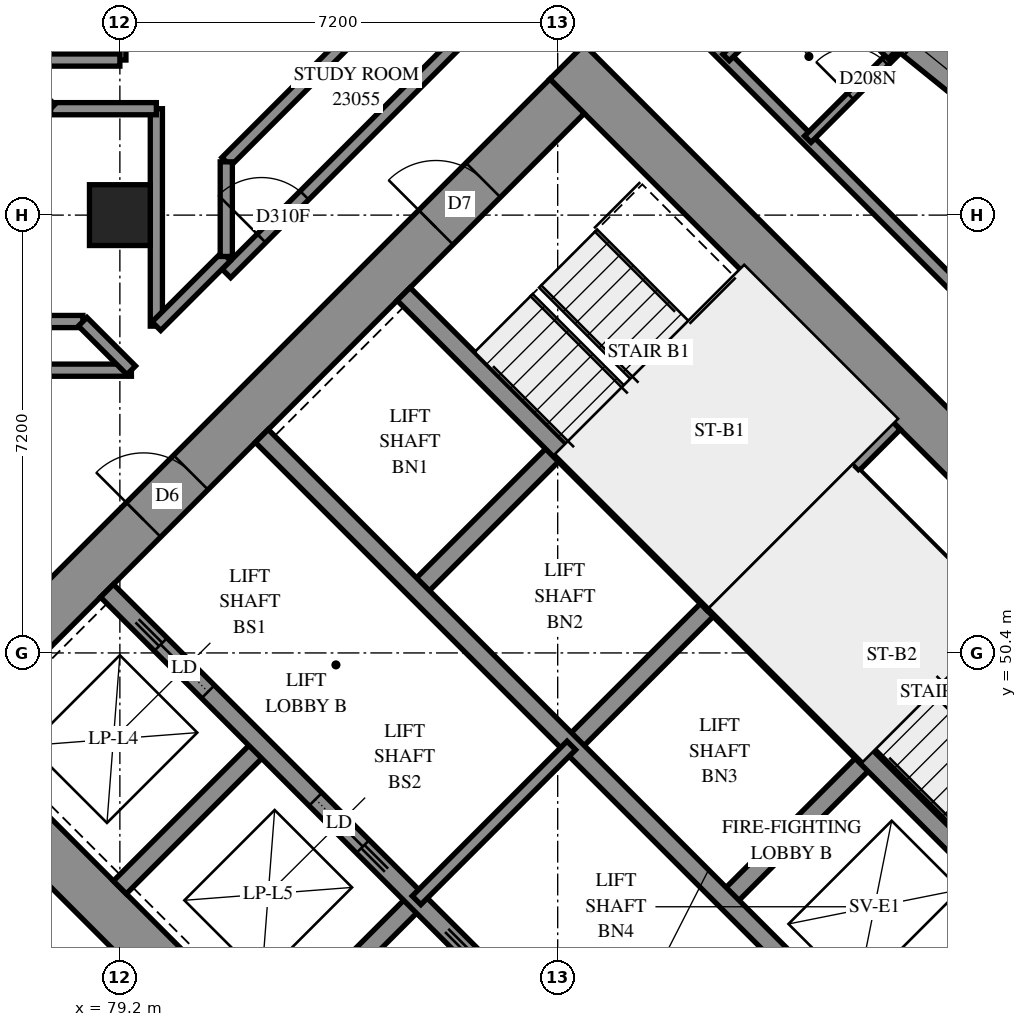
"""IFC4 building model, lengths in metres.
Left out: names, types, materials, properties, quantities, classifications, styles, units other than length and angle.
Written with IfcOpenShell. Run it as: python <this file> out.ifc"""

import sys

from ifc_helpers import new_model, si_unit, direction, frame, frame_2d, origin, origin_2d, place, context, subcontext, project, spatial, polyline, rectangle, outline, extrude, element, fill, save


model = new_model("IFC4")
c1 = context("Model", 3, precision=1e-05, world=origin(), true_north=direction((0.0, 1.0)))
c2 = subcontext(c1, "Body", "Model", "MODEL_VIEW")
j1 = project(units=[si_unit("LENGTHUNIT", "METRE"), si_unit("PLANEANGLEUNIT", "RADIAN")], contexts=[c1])
p1 = place(None, origin())
s1 = spatial("IfcSite", under=j1, at=p1, CompositionType="ELEMENT")
p2 = place(p1, origin())
s2 = spatial("IfcBuilding", under=s1, at=p2, CompositionType="ELEMENT")
p3 = place(p2, frame((0.0, 0.0, 88.0)))
s3 = spatial("IfcBuildingStorey", under=s2, at=p3, CompositionType="ELEMENT", Elevation=88.0)
p4 = place(p3, frame((79.2, 57.6, 0.0), z_axis=(0.0, 0.0, 1.0), x_axis=(1.0, 0.0, 0.0)))
e1 = element("IfcColumn", 1, at=p4, inside=s3, PredefinedType="COLUMN", context=c2, shape_type="SweptSolid", body=[
    extrude(rectangle(XDim=1.0, YDim=1.0, at=origin_2d()), origin(), (0.0, 0.0, 1.0), 3.1),
])
p5 = place(p3, frame((75.806, 49.373, -0.3), z_axis=(0.0, 0.0, 1.0), x_axis=(0.7071067812, -0.7071067812, 0.0)))
e2 = element("IfcWall", 2, at=p5, inside=s3, PredefinedType="SHEAR", context=c2, shape_type="SweptSolid", body=[
    extrude(rectangle(XDim=16.0, YDim=0.8, at=frame_2d((8.0, 0.0))), origin(), (0.0, 0.0, 1.0), 2.7),
])
p6 = place(p3, frame((86.554, 60.121, -0.3), z_axis=(0.0, 0.0, 1.0), x_axis=(0.7071067812, -0.7071067812, 0.0)))
e3 = element("IfcWall", 3, at=p6, inside=s3, PredefinedType="SHEAR", context=c2, shape_type="SweptSolid", body=[
    extrude(rectangle(XDim=16.0, YDim=0.8, at=frame_2d((8.0, 0.0))), origin(), (0.0, 0.0, 1.0), 2.7),
])
p7 = place(p6, frame((10.8, 0.0, 0.3)))
e4 = element("IfcOpeningElement", 4, at=p7, cuts=e3, PredefinedType="OPENING", context=c2, shape_type="SweptSolid", body=[
    extrude(rectangle(XDim=0.8, YDim=2.1, at=frame_2d((0.4, 1.05))), frame((0.0, 0.41, 0.0), z_axis=(0.0, -1.0, 0.0), x_axis=(1.0, 0.0, 0.0)), (0.0, 0.0, 1.0), 0.82),
])
p8 = place(p3, frame((76.372, 49.373, -0.3), z_axis=(0.0, 0.0, 1.0), x_axis=(0.7071067812, 0.7071067812, 0.0)))
e5 = element("IfcWall", 5, at=p8, inside=s3, PredefinedType="SHEAR", context=c2, shape_type="SweptSolid", body=[
    extrude(rectangle(XDim=14.4, YDim=0.8, at=frame_2d((7.2, 0.0))), origin(), (0.0, 0.0, 1.0), 2.7),
])
p9 = place(p8, frame((4.55, 0.0, 0.3)))
e6 = element("IfcOpeningElement", 6, at=p9, cuts=e5, PredefinedType="OPENING", context=c2, shape_type="SweptSolid", body=[
    extrude(rectangle(XDim=1.1, YDim=2.1, at=frame_2d((0.55, 1.05))), frame((0.0, 0.41, 0.0), z_axis=(0.0, -1.0, 0.0), x_axis=(1.0, 0.0, 0.0)), (0.0, 0.0, 1.0), 0.82),
])
p10 = place(p8, frame((11.35, 0.0, 0.3)))
e7 = element("IfcOpeningElement", 7, at=p10, cuts=e5, PredefinedType="OPENING", context=c2, shape_type="SweptSolid", body=[
    extrude(rectangle(XDim=1.1, YDim=2.1, at=frame_2d((0.55, 1.05))), frame((0.0, 0.41, 0.0), z_axis=(0.0, -1.0, 0.0), x_axis=(1.0, 0.0, 0.0)), (0.0, 0.0, 1.0), 0.82),
])
p11 = place(p3, frame((87.12, 38.625, -0.3), z_axis=(0.0, 0.0, 1.0), x_axis=(0.7071067812, 0.7071067812, 0.0)))
e8 = element("IfcWall", 8, at=p11, inside=s3, PredefinedType="SHEAR", context=c2, shape_type="SweptSolid", body=[
    extrude(rectangle(XDim=14.4, YDim=0.8, at=frame_2d((7.2, 0.0))), origin(), (0.0, 0.0, 1.0), 2.7),
])
p12 = place(p11, frame((4.55, 0.0, 0.3)))
e9 = element("IfcOpeningElement", 9, at=p12, cuts=e8, PredefinedType="OPENING", context=c2, shape_type="SweptSolid", body=[
    extrude(rectangle(XDim=1.1, YDim=2.1, at=frame_2d((0.55, 1.05))), frame((0.0, 0.41, 0.0), z_axis=(0.0, -1.0, 0.0), x_axis=(1.0, 0.0, 0.0)), (0.0, 0.0, 1.0), 0.82),
])
p13 = place(p11, frame((11.35, 0.0, 0.3)))
e10 = element("IfcOpeningElement", 10, at=p13, cuts=e8, PredefinedType="OPENING", context=c2, shape_type="SweptSolid", body=[
    extrude(rectangle(XDim=1.1, YDim=2.1, at=frame_2d((0.55, 1.05))), frame((0.0, 0.41, 0.0), z_axis=(0.0, -1.0, 0.0), x_axis=(1.0, 0.0, 0.0)), (0.0, 0.0, 1.0), 0.82),
])
for number, where, z_axis, x_axis in (
    (11, (79.2, 46.544, 0.0), (0.0, 0.0, 1.0), (0.707, 0.707, 0.0)),
    (12, (84.079, 51.423, 0.0), (0.0, 0.0, 1.0), (0.707, 0.707, 0.0)),
):
    element("IfcWall", number, at=place(p3, frame(where, z_axis=z_axis, x_axis=x_axis)), inside=s3, PredefinedType="SOLIDWALL", context=c2, shape_type="SweptSolid", body=[
        extrude(rectangle(XDim=3.3, YDim=0.3, at=frame_2d((1.65, 0.0))), origin(), (0.0, 0.0, 1.0), 3.1),
    ])
p14 = place(p3, frame((81.746, 43.999, 0.0), z_axis=(0.0, 0.0, 1.0), x_axis=(0.7071067812, 0.7071067812, 0.0)))
e13 = element("IfcWall", 13, at=p14, inside=s3, PredefinedType="SOLIDWALL", context=c2, shape_type="SweptSolid", body=[
    extrude(rectangle(XDim=3.3, YDim=0.3, at=frame_2d((1.65, 0.0))), origin(), (0.0, 0.0, 1.0), 3.1),
])
for number, where, z_axis, x_axis in (
    (14, (86.625, 48.878, 0.0), (0.0, 0.0, 1.0), (0.707, 0.707, 0.0)),
    (15, (89.17, 46.332, 0.0), (0.0, 0.0, 1.0), (0.707, 0.707, 0.0)),
):
    element("IfcWall", number, at=place(p3, frame(where, z_axis=z_axis, x_axis=x_axis)), inside=s3, PredefinedType="SOLIDWALL", context=c2, shape_type="SweptSolid", body=[
        extrude(rectangle(XDim=3.3, YDim=0.3, at=frame_2d((1.65, 0.0))), origin(), (0.0, 0.0, 1.0), 3.1),
    ])
p15 = place(p3, frame((78.988, 51.423, 0.0), z_axis=(0.0, 0.0, 1.0), x_axis=(0.7071067812, -0.7071067812, 0.0)))
e16 = element("IfcWall", 16, at=p15, inside=s3, PredefinedType="SOLIDWALL", context=c2, shape_type="SweptSolid", body=[
    extrude(rectangle(XDim=14.4, YDim=0.3, at=frame_2d((7.2, 0.0))), origin(), (0.0, 0.0, 1.0), 3.1),
])
p16 = place(p15, frame((1.25, 0.0, 0.0)))
e17 = element("IfcOpeningElement", 17, at=p16, cuts=e16, PredefinedType="OPENING", context=c2, shape_type="SweptSolid", body=[
    extrude(rectangle(XDim=1.1, YDim=2.1, at=frame_2d((0.55, 1.05))), frame((0.0, 0.16, 0.0), z_axis=(0.0, -1.0, 0.0), x_axis=(1.0, 0.0, 0.0)), (0.0, 0.0, 1.0), 0.32),
])
p17 = place(p15, frame((4.85, 0.0, 0.0)))
e18 = element("IfcOpeningElement", 18, at=p17, cuts=e16, PredefinedType="OPENING", context=c2, shape_type="SweptSolid", body=[
    extrude(rectangle(XDim=1.1, YDim=2.1, at=frame_2d((0.55, 1.05))), frame((0.0, 0.16, 0.0), z_axis=(0.0, -1.0, 0.0), x_axis=(1.0, 0.0, 0.0)), (0.0, 0.0, 1.0), 0.32),
])
p18 = place(p15, frame((8.45, 0.0, 0.0)))
e19 = element("IfcOpeningElement", 19, at=p18, cuts=e16, PredefinedType="OPENING", context=c2, shape_type="SweptSolid", body=[
    extrude(rectangle(XDim=1.1, YDim=2.1, at=frame_2d((0.55, 1.05))), frame((0.0, 0.16, 0.0), z_axis=(0.0, -1.0, 0.0), x_axis=(1.0, 0.0, 0.0)), (0.0, 0.0, 1.0), 0.32),
])
p19 = place(p15, frame((12.05, 0.0, 0.0)))
e20 = element("IfcOpeningElement", 20, at=p19, cuts=e16, PredefinedType="OPENING", context=c2, shape_type="SweptSolid", body=[
    extrude(rectangle(XDim=1.1, YDim=2.1, at=frame_2d((0.55, 1.05))), frame((0.0, 0.16, 0.0), z_axis=(0.0, -1.0, 0.0), x_axis=(1.0, 0.0, 0.0)), (0.0, 0.0, 1.0), 0.32),
])
p20 = place(p3, frame((81.534, 53.969, 0.0), z_axis=(0.0, 0.0, 1.0), x_axis=(0.707103309, -0.7071102534, 0.0)))
e21 = element("IfcWall", 21, at=p20, inside=s3, PredefinedType="SOLIDWALL", context=c2, shape_type="SweptSolid", body=[
    extrude(rectangle(XDim=14.4, YDim=0.3, at=frame_2d((7.2, 0.0))), origin(), (0.0, 0.0, 1.0), 3.1),
])
p21 = place(p20, frame((12.05, 0.0, 0.0)))
e22 = element("IfcOpeningElement", 22, at=p21, cuts=e21, PredefinedType="OPENING", context=c2, shape_type="SweptSolid", body=[
    extrude(rectangle(XDim=1.1, YDim=2.1, at=frame_2d((0.55, 1.05))), frame((0.0, 0.16, 0.0), z_axis=(0.0, -1.0, 0.0), x_axis=(1.0, 0.0, 0.0)), (0.0, 0.0, 1.0), 0.32),
])
for number, where, z_axis, x_axis in (
    (23, (83.867, 56.302, 0.0), (0.0, 0.0, 1.0), (0.707, -0.707, 0.0)),
    (24, (88.958, 51.211, 0.0), (0.0, 0.0, 1.0), (0.707, -0.707, 0.0)),
):
    element("IfcWall", number, at=place(p3, frame(where, z_axis=z_axis, x_axis=x_axis)), inside=s3, PredefinedType="SOLIDWALL", context=c2, shape_type="SweptSolid", body=[
        extrude(rectangle(XDim=7.2, YDim=0.3, at=frame_2d((3.6, 0.0))), origin(), (0.0, 0.0, 1.0), 3.1),
    ])
p22 = place(p3, frame((88.958, 51.211, 0.0), z_axis=(0.0, 0.0, 1.0), x_axis=(0.7071067812, 0.7071067812, 0.0)))
e25 = element("IfcWall", 25, at=p22, inside=s3, PredefinedType="SOLIDWALL", context=c2, shape_type="SweptSolid", body=[
    extrude(rectangle(XDim=4.2, YDim=0.3, at=frame_2d((2.1, 0.0))), origin(), (0.0, 0.0, 1.0), 3.1),
])
p23 = place(p3, frame((93.929, 59.087, 0.0), z_axis=(0.0, 0.0, 1.0), x_axis=(-0.777677697, 0.6286631845, 0.0)))
e26 = element("IfcWall", 26, at=p23, inside=s3, PredefinedType="SOLIDWALL", context=c2, shape_type="SweptSolid", body=[
    extrude(outline(polyline([(-0.029, -0.275), (3.397, -0.275), (3.455, 0.275), (0.029, 0.275), (-0.029, -0.275)])), origin(), (0.0, 0.0, 1.0), 3.1),
])
p24 = place(p23, frame((0.94, 0.0, 0.5)))
e27 = element("IfcOpeningElement", 27, at=p24, cuts=e26, PredefinedType="OPENING", context=c2, shape_type="SweptSolid", body=[
    extrude(rectangle(XDim=1.2, YDim=2.45, at=frame_2d((0.6, 1.225))), frame((0.0, 0.285, 0.0), z_axis=(0.0, -1.0, 0.0), x_axis=(1.0, 0.0, 0.0)), (0.0, 0.0, 1.0), 0.57),
])
p25 = place(p3, frame((91.313, 53.354, 0.0), z_axis=(0.0, 0.0, 1.0), x_axis=(0.7071140275, -0.7070995348, 0.0)))
e28 = element("IfcWall", 28, at=p25, inside=s3, PredefinedType="PARTITIONING", context=c2, shape_type="SweptSolid", body=[
    extrude(rectangle(XDim=6.9, YDim=0.15, at=frame_2d((3.45, 0.0))), origin(), (0.0, 0.0, 1.0), 3.1),
])
p26 = place(p3, frame((84.079, 46.332, 0.0), z_axis=(0.0, 0.0, 1.0), x_axis=(0.7071067812, 0.7071067812, 0.0)))
e29 = element("IfcWall", 29, at=p26, inside=s3, PredefinedType="PARTITIONING", context=c2, shape_type="SweptSolid", body=[
    extrude(rectangle(XDim=3.6, YDim=0.2, at=frame_2d((1.8, 0.0))), origin(), (0.0, 0.0, 1.0), 3.1),
])
p27 = place(p3, frame((87.894, 61.461, 0.0), z_axis=(0.0, 0.0, 1.0), x_axis=(0.7071067812, -0.7071067812, 0.0)))
e30 = element("IfcWall", 30, at=p27, inside=s3, PredefinedType="PARTITIONING", context=c2, shape_type="SweptSolid", body=[
    extrude(rectangle(XDim=17.5, YDim=0.2, at=frame_2d((8.75, 0.0))), origin(), (0.0, 0.0, 1.0), 3.1),
])
p28 = place(p27, frame((8.735, 0.0, 0.0)))
e31 = element("IfcOpeningElement", 31, at=p28, cuts=e30, PredefinedType="OPENING", context=c2, shape_type="SweptSolid", body=[
    extrude(rectangle(XDim=0.9, YDim=2.1, at=frame_2d((0.45, 1.05))), frame((0.0, 0.11, 0.0), z_axis=(0.0, -1.0, 0.0), x_axis=(1.0, 0.0, 0.0)), (0.0, 0.0, 1.0), 0.22),
])
p29 = place(p3, frame((80.949, 58.477, 0.0), z_axis=(0.0, 0.0, 1.0), x_axis=(0.7071122585, 0.7071013038, 0.0)))
e32 = element("IfcWall", 32, at=p29, inside=s3, PredefinedType="PARTITIONING", context=c2, shape_type="SweptSolid", body=[
    extrude(rectangle(XDim=9.129, YDim=0.2, at=frame_2d((4.564, 0.0))), origin(), (0.0, 0.0, 1.0), 3.1),
])
p30 = place(p3, frame((80.951, 56.641, 0.0), z_axis=(0.0, 0.0, 1.0), x_axis=(0.7071067812, 0.7071067812, 0.0)))
e33 = element("IfcWall", 33, at=p30, inside=s3, PredefinedType="PARTITIONING", context=c2, shape_type="SweptSolid", body=[
    extrude(rectangle(XDim=8.321, YDim=0.2, at=frame_2d((4.161, 0.0))), origin(), (0.0, 0.0, 1.0), 3.1),
])
p31 = place(p30, frame((0.816, 0.0, 0.0)))
e34 = element("IfcOpeningElement", 34, at=p31, cuts=e33, PredefinedType="OPENING", context=c2, shape_type="SweptSolid", body=[
    extrude(rectangle(XDim=1.0, YDim=2.1, at=frame_2d((0.5, 1.05))), frame((0.0, 0.11, 0.0), z_axis=(0.0, -1.0, 0.0), x_axis=(1.0, 0.0, 0.0)), (0.0, 0.0, 1.0), 0.22),
])
p32 = place(p3, frame((74.302, 55.05, 0.0), z_axis=(0.0, 0.0, 1.0), x_axis=(1.0, 0.0, 0.0)))
e35 = element("IfcWall", 35, at=p32, inside=s3, PredefinedType="PARTITIONING", context=c2, shape_type="SweptSolid", body=[
    extrude(rectangle(XDim=5.088, YDim=0.2, at=frame_2d((2.544, 0.0))), origin(), (0.0, 0.0, 1.0), 3.1),
])
p33 = place(p32, frame((1.176, 0.0, 0.0)))
e36 = element("IfcOpeningElement", 36, at=p33, cuts=e35, PredefinedType="OPENING", context=c2, shape_type="SweptSolid", body=[
    extrude(rectangle(XDim=1.0, YDim=2.1, at=frame_2d((0.5, 1.05))), frame((0.0, 0.11, 0.0), z_axis=(0.0, -1.0, 0.0), x_axis=(1.0, 0.0, 0.0)), (0.0, 0.0, 1.0), 0.22),
])
p34 = place(p3, frame((79.8, 55.774, 0.0), z_axis=(0.0, 0.0, 1.0), x_axis=(0.0, 1.0, 0.0)))
e37 = element("IfcWall", 37, at=p34, inside=s3, PredefinedType="PARTITIONING", context=c2, shape_type="SweptSolid", body=[
    extrude(rectangle(XDim=3.576, YDim=0.2, at=frame_2d((1.788, 0.0))), origin(), (0.0, 0.0, 1.0), 3.1),
])
p35 = place(p3, frame((79.2, 60.15, 0.0), z_axis=(0.0, 0.0, 1.0), x_axis=(0.0, 1.0, 0.0)))
e38 = element("IfcWall", 38, at=p35, inside=s3, PredefinedType="PARTITIONING", context=c2, shape_type="SweptSolid", body=[
    extrude(rectangle(XDim=2.1, YDim=0.2, at=frame_2d((1.05, 0.0))), origin(), (0.0, 0.0, 1.0), 3.1),
])
p36 = place(p3, frame((90.513, 58.849, 0.0), z_axis=(0.0, 0.0, 1.0), x_axis=(0.7071309413, 0.7070826202, 0.0)))
e39 = element("IfcWall", 39, at=p36, inside=s3, PredefinedType="PARTITIONING", context=c2, shape_type="SweptSolid", body=[
    extrude(rectangle(XDim=2.07, YDim=0.15, at=frame_2d((1.035, 0.0))), origin(), (0.0, 0.0, 1.0), 3.1),
])
p37 = place(p36, frame((0.996, 0.0, 0.0)))
e40 = element("IfcOpeningElement", 40, at=p37, cuts=e39, PredefinedType="OPENING", context=c2, shape_type="SweptSolid", body=[
    extrude(rectangle(XDim=0.8, YDim=2.1, at=frame_2d((0.4, 1.05))), frame((0.0, 0.085, 0.0), z_axis=(0.0, -1.0, 0.0), x_axis=(1.0, 0.0, 0.0)), (0.0, 0.0, 1.0), 0.17),
])
p38 = place(p3, frame((89.169, 60.193, 0.0), z_axis=(0.0, 0.0, 1.0), x_axis=(0.7076498168, 0.7065633282, 0.0)))
e41 = element("IfcWall", 41, at=p38, inside=s3, PredefinedType="PARTITIONING", context=c2, shape_type="SweptSolid", body=[
    extrude(rectangle(XDim=2.025, YDim=0.15, at=frame_2d((1.012, 0.0))), origin(), (0.0, 0.0, 1.0), 3.1),
])
p39 = place(p3, frame((77.264, 60.15, 0.0), z_axis=(0.0, 0.0, 1.0), x_axis=(1.0, 0.0, 0.0)))
e42 = element("IfcWall", 42, at=p39, inside=s3, PredefinedType="PARTITIONING", context=c2, shape_type="SweptSolid", body=[
    extrude(rectangle(XDim=1.936, YDim=0.2, at=frame_2d((0.968, 0.0))), origin(), (0.0, 0.0, 1.0), 3.1),
])
p40 = place(p3, frame((78.062, 59.35, 0.0), z_axis=(0.0, 0.0, 1.0), x_axis=(1.0, 0.0, 0.0)))
e43 = element("IfcWall", 43, at=p40, inside=s3, PredefinedType="PARTITIONING", context=c2, shape_type="SweptSolid", body=[
    extrude(rectangle(XDim=1.738, YDim=0.2, at=frame_2d((0.869, 0.0))), origin(), (0.0, 0.0, 1.0), 3.1),
])
p41 = place(p3, frame((79.801, 55.773, 0.0), z_axis=(0.0, 0.0, 1.0), x_axis=(0.7071067812, 0.7071067812, 0.0)))
e44 = element("IfcWall", 44, at=p41, inside=s3, PredefinedType="PARTITIONING", context=c2, shape_type="SweptSolid", body=[
    extrude(rectangle(XDim=1.623, YDim=0.2, at=frame_2d((0.812, 0.0))), origin(), (0.0, 0.0, 1.0), 3.1),
])
p42 = place(p3, frame((80.95, 56.92, 0.0), z_axis=(0.0, 0.0, 1.0), x_axis=(0.0, 1.0, 0.0)))
e45 = element("IfcWall", 45, at=p42, inside=s3, PredefinedType="PARTITIONING", context=c2, shape_type="SweptSolid", body=[
    extrude(rectangle(XDim=1.556, YDim=0.2, at=frame_2d((0.778, 0.0))), origin(), (0.0, 0.0, 1.0), 3.1),
])
p43 = place(p3, frame((77.452, 55.85, 0.0), z_axis=(0.0, 0.0, 1.0), x_axis=(1.0, 0.0, 0.0)))
e46 = element("IfcWall", 46, at=p43, inside=s3, PredefinedType="PARTITIONING", context=c2, shape_type="SweptSolid", body=[
    extrude(rectangle(XDim=1.14, YDim=0.2, at=frame_2d((0.57, 0.0))), origin(), (0.0, 0.0, 1.0), 3.1),
])
for number, where, z_axis, x_axis in (
    (47, (77.26, 60.145, 0.0), (0.0, 0.0, 1.0), (0.707, -0.707, 0.0)),
    (48, (78.589, 55.847, 0.0), (0.0, 0.0, 1.0), (0.707, -0.707, 0.0)),
):
    element("IfcWall", number, at=place(p3, frame(where, z_axis=z_axis, x_axis=x_axis)), inside=s3, PredefinedType="PARTITIONING", context=c2, shape_type="SweptSolid", body=[
        extrude(rectangle(XDim=1.129, YDim=0.2, at=frame_2d((0.564, 0.0))), origin(), (0.0, 0.0, 1.0), 3.1),
    ])
p44 = place(p3, frame((91.621, 60.491, 0.0), z_axis=(0.0, 0.0, 1.0), x_axis=(0.7071067812, -0.7071067812, 0.0)))
e49 = element("IfcWall", 49, at=p44, inside=s3, PredefinedType="PARTITIONING", context=c2, shape_type="SweptSolid", body=[
    extrude(rectangle(XDim=0.379, YDim=0.15, at=frame_2d((0.19, 0.0))), origin(), (0.0, 0.0, 1.0), 3.1),
])
p45 = place(p24, origin())
e50 = element("IfcWindow", 50, at=p45, inside=s3, PartitioningType="SINGLE_PANEL", PredefinedType="WINDOW", context=c2, shape_type="SweptSolid", body=[
    extrude(rectangle(XDim=1.2, YDim=2.45, at=frame_2d((0.6, 1.225))), frame((0.0, 0.155, 0.0), z_axis=(0.0, -1.0, 0.0), x_axis=(1.0, 0.0, 0.0)), (0.0, 0.0, 1.0), 0.06),
])
fill(e27, e50)
p46 = place(p9, origin())
e51 = element("IfcDoor", 51, at=p46, inside=s3, OperationType="DOUBLE_DOOR_SINGLE_SWING", PredefinedType="DOOR", context=c2, shape_type="SweptSolid", body=[
    extrude(rectangle(XDim=1.1, YDim=2.1, at=frame_2d((0.55, 1.05))), frame((0.0, 0.025, 0.0), z_axis=(0.0, -1.0, 0.0), x_axis=(1.0, 0.0, 0.0)), (0.0, 0.0, 1.0), 0.05),
])
fill(e6, e51)
p47 = place(p10, origin())
e52 = element("IfcDoor", 52, at=p47, inside=s3, OperationType="SINGLE_SWING_LEFT", PredefinedType="DOOR", context=c2, shape_type="SweptSolid", body=[
    extrude(rectangle(XDim=1.1, YDim=2.1, at=frame_2d((0.55, 1.05))), frame((0.0, 0.025, 0.0), z_axis=(0.0, -1.0, 0.0), x_axis=(1.0, 0.0, 0.0)), (0.0, 0.0, 1.0), 0.05),
])
fill(e7, e52)
p48 = place(p16, origin())
e53 = element("IfcDoor", 53, at=p48, inside=s3, OperationType="SLIDING_TO_LEFT", PredefinedType="DOOR", context=c2, shape_type="SweptSolid", body=[
    extrude(rectangle(XDim=1.1, YDim=2.1, at=frame_2d((0.55, 1.05))), frame((0.0, 0.025, 0.0), z_axis=(0.0, -1.0, 0.0), x_axis=(1.0, 0.0, 0.0)), (0.0, 0.0, 1.0), 0.05),
])
fill(e17, e53)
p49 = place(p17, origin())
e54 = element("IfcDoor", 54, at=p49, inside=s3, OperationType="SLIDING_TO_RIGHT", PredefinedType="DOOR", context=c2, shape_type="SweptSolid", body=[
    extrude(rectangle(XDim=1.1, YDim=2.1, at=frame_2d((0.55, 1.05))), frame((0.0, 0.025, 0.0), z_axis=(0.0, -1.0, 0.0), x_axis=(1.0, 0.0, 0.0)), (0.0, 0.0, 1.0), 0.05),
])
fill(e18, e54)
p50 = place(p31, origin())
e55 = element("IfcDoor", 55, at=p50, inside=s3, OperationType="SINGLE_SWING_RIGHT", PredefinedType="DOOR", context=c2, shape_type="SweptSolid", body=[
    extrude(rectangle(XDim=1.0, YDim=2.1, at=frame_2d((0.5, 1.05))), frame((0.0, 0.025, 0.0), z_axis=(0.0, -1.0, 0.0), x_axis=(1.0, 0.0, 0.0)), (0.0, 0.0, 1.0), 0.05),
])
fill(e34, e55)
p51 = place(p37, origin())
e56 = element("IfcDoor", 56, at=p51, inside=s3, OperationType="SINGLE_SWING_RIGHT", PredefinedType="DOOR", context=c2, shape_type="SweptSolid", body=[
    extrude(rectangle(XDim=0.8, YDim=2.1, at=frame_2d((0.4, 1.05))), frame((0.0, 0.025, 0.0), z_axis=(0.0, -1.0, 0.0), x_axis=(1.0, 0.0, 0.0)), (0.0, 0.0, 1.0), 0.05),
])
fill(e40, e56)
save(model, sys.argv[1])
